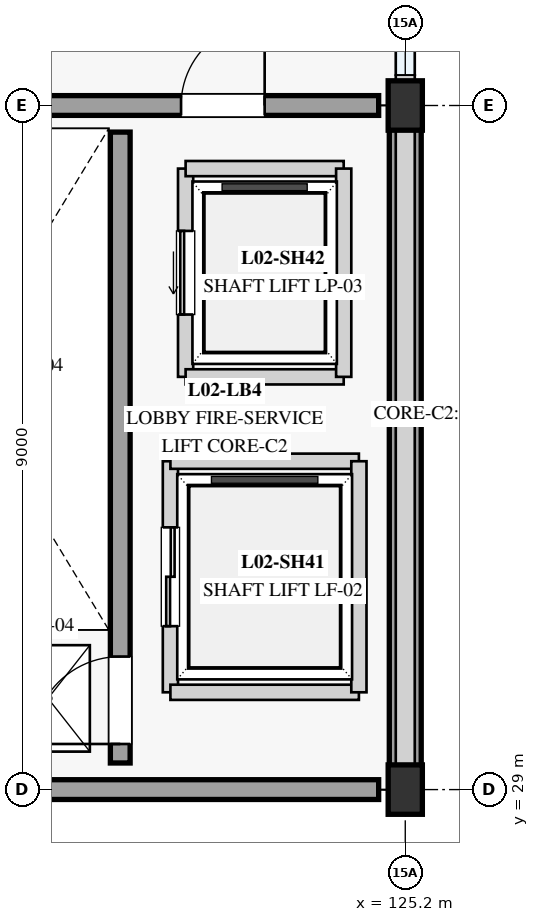
"""IFC4 building model, lengths in metres.
Left out: names, types, materials, properties, quantities, classifications, styles, units other than length and angle.
Written with IfcOpenShell. Run it as: python <this file> out.ifc"""

import sys

from ifc_helpers import new_model, si_unit, direction, frame, frame_2d, origin, origin_2d, place, context, subcontext, project, spatial, rectangle, extrude, element, fill, save


model = new_model("IFC4")
c1 = context("Model", 3, precision=1e-05, world=origin(), true_north=direction((0.0, 1.0)))
c2 = subcontext(c1, "Body", "Model", "MODEL_VIEW")
j1 = project(units=[si_unit("LENGTHUNIT", "METRE"), si_unit("PLANEANGLEUNIT", "RADIAN")], contexts=[c1])
p1 = place(None, origin())
s1 = spatial("IfcSite", under=j1, at=p1, CompositionType="ELEMENT")
p2 = place(p1, origin())
s2 = spatial("IfcBuilding", under=s1, at=p2, CompositionType="ELEMENT")
p3 = place(p2, frame((0.0, 0.0, 8.4)))
s3 = spatial("IfcBuildingStorey", under=s2, at=p3, CompositionType="ELEMENT", Elevation=8.4)
for number, where, z_axis, x_axis in (
    (1, (125.2, 29.0, 0.0), (0.0, 0.0, 1.0), (1.0, 0.0, 0.0)),
    (2, (125.2, 38.0, 0.0), (0.0, 0.0, 1.0), (1.0, 0.0, 0.0)),
):
    element("IfcColumn", number, at=place(p3, frame(where, z_axis=z_axis, x_axis=x_axis)), inside=s3, PredefinedType="COLUMN", context=c2, shape_type="SweptSolid", body=[
        extrude(rectangle(XDim=0.45, YDim=0.65, at=origin_2d()), origin(), (0.0, 0.0, 1.0), 3.29),
    ])
p4 = place(p2, frame((0.0, 0.0, 4.5)))
s4 = spatial("IfcBuildingStorey", under=s2, at=p4, CompositionType="ELEMENT", Elevation=4.5)
p5 = place(p4, frame((126.0, 29.0, 0.0), z_axis=(0.0, 0.0, 1.0), x_axis=(1.0, 0.0, 0.0)))
e3 = element("IfcColumn", 3, at=p5, inside=s4, PredefinedType="COLUMN", context=c2, shape_type="SweptSolid", body=[
    extrude(rectangle(XDim=0.45, YDim=0.65, at=origin_2d()), origin(), (0.0, 0.0, 1.0), 5.59),
])
p6 = place(p3, frame((125.2, 29.0, 0.0), z_axis=(0.0, 0.0, 1.0), x_axis=(0.0, 1.0, 0.0)))
e4 = element("IfcWall", 4, at=p6, inside=s3, PredefinedType="STANDARD", context=c2, shape_type="SweptSolid", body=[
    extrude(rectangle(XDim=9.0, YDim=0.42, at=frame_2d((4.5, 0.0))), origin(), (0.0, 0.0, 1.0), 3.29),
])
p7 = place(p3, frame((125.2, 29.0, 3.6), z_axis=(0.0, 0.0, 1.0), x_axis=(0.0, 1.0, 0.0)))
e5 = element("IfcWall", 5, at=p7, inside=s3, PredefinedType="PARAPET", context=c2, shape_type="SweptSolid", body=[
    extrude(rectangle(XDim=63.0, YDim=0.25, at=frame_2d((31.5, 0.0))), origin(), (0.0, 0.0, 1.0), 0.85),
])
p8 = place(p3, frame((121.45, 29.35, 0.0), z_axis=(0.0, 0.0, 1.0), x_axis=(0.0, 1.0, 0.0)))
e6 = element("IfcWall", 6, at=p8, inside=s3, PredefinedType="SHEAR", context=c2, shape_type="SweptSolid", body=[
    extrude(rectangle(XDim=8.3, YDim=0.26, at=frame_2d((4.15, 0.0))), origin(), (0.0, 0.0, 1.0), 3.2),
])
p9 = place(p8, frame((0.25, 0.0, 0.0)))
e7 = element("IfcOpeningElement", 7, at=p9, cuts=e6, PredefinedType="OPENING", context=c2, shape_type="SweptSolid", body=[
    extrude(rectangle(XDim=1.15, YDim=2.15, at=frame_2d((0.575, 1.075))), frame((0.0, 0.14, 0.0), z_axis=(0.0, -1.0, 0.0), x_axis=(1.0, 0.0, 0.0)), (0.0, 0.0, 1.0), 0.28),
])
p10 = place(p3, frame((117.35, 29.0, 0.0), z_axis=(0.0, 0.0, 1.0), x_axis=(1.0, 0.0, 0.0)))
e8 = element("IfcWall", 8, at=p10, inside=s3, PredefinedType="SHEAR", context=c2, shape_type="SweptSolid", body=[
    extrude(rectangle(XDim=7.5, YDim=0.26, at=frame_2d((3.75, 0.0))), origin(), (0.0, 0.0, 1.0), 3.2),
])
p11 = place(p3, frame((117.35, 38.0, 0.0), z_axis=(0.0, 0.0, 1.0), x_axis=(1.0, 0.0, 0.0)))
e9 = element("IfcWall", 9, at=p11, inside=s3, PredefinedType="SHEAR", context=c2, shape_type="SweptSolid", body=[
    extrude(rectangle(XDim=7.5, YDim=0.26, at=frame_2d((3.75, 0.0))), origin(), (0.0, 0.0, 1.0), 3.2),
])
p12 = place(p11, frame((4.9, 0.0, 0.0)))
e10 = element("IfcOpeningElement", 10, at=p12, cuts=e9, PredefinedType="OPENING", context=c2, shape_type="SweptSolid", body=[
    extrude(rectangle(XDim=1.1, YDim=2.1, at=frame_2d((0.55, 1.05))), frame((0.0, 0.14, 0.0), z_axis=(0.0, -1.0, 0.0), x_axis=(1.0, 0.0, 0.0)), (0.0, 0.0, 1.0), 0.28),
])
p13 = place(p3, frame((122.11, 30.28, 0.0), z_axis=(0.0, 0.0, 1.0), x_axis=(0.0, 1.0, 0.0)))
e11 = element("IfcWall", 11, at=p13, inside=s3, PredefinedType="SOLIDWALL", context=c2, shape_type="SweptSolid", body=[
    extrude(rectangle(XDim=3.04, YDim=0.2, at=frame_2d((1.52, 0.0))), origin(), (0.0, 0.0, 1.0), 2.4),
])
p14 = place(p13, frame((0.87, 0.0, 0.0)))
e12 = element("IfcOpeningElement", 12, at=p14, cuts=e11, PredefinedType="OPENING", context=c2, shape_type="SweptSolid", body=[
    extrude(rectangle(XDim=1.3, YDim=2.2, at=frame_2d((0.65, 1.1))), frame((0.0, 0.11, 0.0), z_axis=(0.0, -1.0, 0.0), x_axis=(1.0, 0.0, 0.0)), (0.0, 0.0, 1.0), 0.22),
])
for number, where, z_axis, x_axis in (
    (13, (122.11, 30.28, 0.0), (0.0, 0.0, 1.0), (1.0, 0.0, 0.0)),
    (14, (122.11, 33.32, 0.0), (0.0, 0.0, 1.0), (1.0, 0.0, 0.0)),
):
    element("IfcWall", number, at=place(p3, frame(where, z_axis=z_axis, x_axis=x_axis)), inside=s3, PredefinedType="SOLIDWALL", context=c2, shape_type="SweptSolid", body=[
        extrude(rectangle(XDim=2.48, YDim=0.2, at=frame_2d((1.24, 0.0))), origin(), (0.0, 0.0, 1.0), 2.4),
    ])
p15 = place(p3, frame((124.59, 30.28, 0.0), z_axis=(0.0, 0.0, 1.0), x_axis=(0.0, 1.0, 0.0)))
e15 = element("IfcWall", 15, at=p15, inside=s3, PredefinedType="SOLIDWALL", context=c2, shape_type="SweptSolid", body=[
    extrude(rectangle(XDim=3.04, YDim=0.2, at=frame_2d((1.52, 0.0))), origin(), (0.0, 0.0, 1.0), 2.4),
])
p16 = place(p3, frame((122.31, 34.43, 0.0), z_axis=(0.0, 0.0, 1.0), x_axis=(0.0, 1.0, 0.0)))
e16 = element("IfcWall", 16, at=p16, inside=s3, PredefinedType="SOLIDWALL", context=c2, shape_type="SweptSolid", body=[
    extrude(rectangle(XDim=2.74, YDim=0.2, at=frame_2d((1.37, 0.0))), origin(), (0.0, 0.0, 1.0), 2.4),
])
p17 = place(p16, frame((0.82, 0.0, 0.0)))
e17 = element("IfcOpeningElement", 17, at=p17, cuts=e16, PredefinedType="OPENING", context=c2, shape_type="SweptSolid", body=[
    extrude(rectangle(XDim=1.1, YDim=2.1, at=frame_2d((0.55, 1.05))), frame((0.0, 0.11, 0.0), z_axis=(0.0, -1.0, 0.0), x_axis=(1.0, 0.0, 0.0)), (0.0, 0.0, 1.0), 0.22),
])
for number, where, z_axis, x_axis in (
    (18, (122.31, 34.43, 0.0), (0.0, 0.0, 1.0), (1.0, 0.0, 0.0)),
    (19, (122.31, 37.17, 0.0), (0.0, 0.0, 1.0), (1.0, 0.0, 0.0)),
):
    element("IfcWall", number, at=place(p3, frame(where, z_axis=z_axis, x_axis=x_axis)), inside=s3, PredefinedType="SOLIDWALL", context=c2, shape_type="SweptSolid", body=[
        extrude(rectangle(XDim=2.08, YDim=0.2, at=frame_2d((1.04, 0.0))), origin(), (0.0, 0.0, 1.0), 2.4),
    ])
p18 = place(p3, frame((124.39, 34.43, 0.0), z_axis=(0.0, 0.0, 1.0), x_axis=(0.0, 1.0, 0.0)))
e20 = element("IfcWall", 20, at=p18, inside=s3, PredefinedType="SOLIDWALL", context=c2, shape_type="SweptSolid", body=[
    extrude(rectangle(XDim=2.74, YDim=0.2, at=frame_2d((1.37, 0.0))), origin(), (0.0, 0.0, 1.0), 2.4),
])
p19 = place(p3, frame((0.0, 0.0, 3.29)))
p20 = place(p19, frame((120.5, 30.2, -0.01)))
p21 = place(p20, frame((0.0, 0.0, 0.27)))
e21 = element("IfcDoor", 21, at=p21, inside=s3, OperationType="SINGLE_SWING_LEFT", PredefinedType="TRAPDOOR", context=c2, shape_type="SweptSolid", body=[
    extrude(rectangle(XDim=1.1, YDim=1.4, at=origin_2d()), origin(), (0.0, 0.0, 1.0), 0.05),
])
p22 = place(p9, origin())
e22 = element("IfcDoor", 22, at=p22, inside=s3, OperationType="SINGLE_SWING_LEFT", PredefinedType="DOOR", context=c2, shape_type="SweptSolid", body=[
    extrude(rectangle(XDim=1.15, YDim=2.15, at=frame_2d((0.575, 1.075))), frame((0.0, 0.025, 0.0), z_axis=(0.0, -1.0, 0.0), x_axis=(1.0, 0.0, 0.0)), (0.0, 0.0, 1.0), 0.05),
])
fill(e7, e22)
p23 = place(p12, origin())
e23 = element("IfcDoor", 23, at=p23, inside=s3, OperationType="SINGLE_SWING_RIGHT", PredefinedType="DOOR", context=c2, shape_type="SweptSolid", body=[
    extrude(rectangle(XDim=1.1, YDim=2.1, at=frame_2d((0.55, 1.05))), frame((0.0, 0.025, 0.0), z_axis=(0.0, -1.0, 0.0), x_axis=(1.0, 0.0, 0.0)), (0.0, 0.0, 1.0), 0.05),
])
fill(e10, e23)
p24 = place(p14, origin())
e24 = element("IfcDoor", 24, at=p24, inside=s3, OperationType="DOUBLE_DOOR_SLIDING", PredefinedType="DOOR", context=c2, shape_type="SweptSolid", body=[
    extrude(rectangle(XDim=1.3, YDim=2.2, at=frame_2d((0.65, 1.1))), frame((0.0, 0.025, 0.0), z_axis=(0.0, -1.0, 0.0), x_axis=(1.0, 0.0, 0.0)), (0.0, 0.0, 1.0), 0.05),
])
fill(e12, e24)
p25 = place(p17, origin())
e25 = element("IfcDoor", 25, at=p25, inside=s3, OperationType="SLIDING_TO_LEFT", PredefinedType="DOOR", context=c2, shape_type="SweptSolid", body=[
    extrude(rectangle(XDim=1.1, YDim=2.1, at=frame_2d((0.55, 1.05))), frame((0.0, 0.025, 0.0), z_axis=(0.0, -1.0, 0.0), x_axis=(1.0, 0.0, 0.0)), (0.0, 0.0, 1.0), 0.05),
])
fill(e17, e25)
save(model, sys.argv[1])
